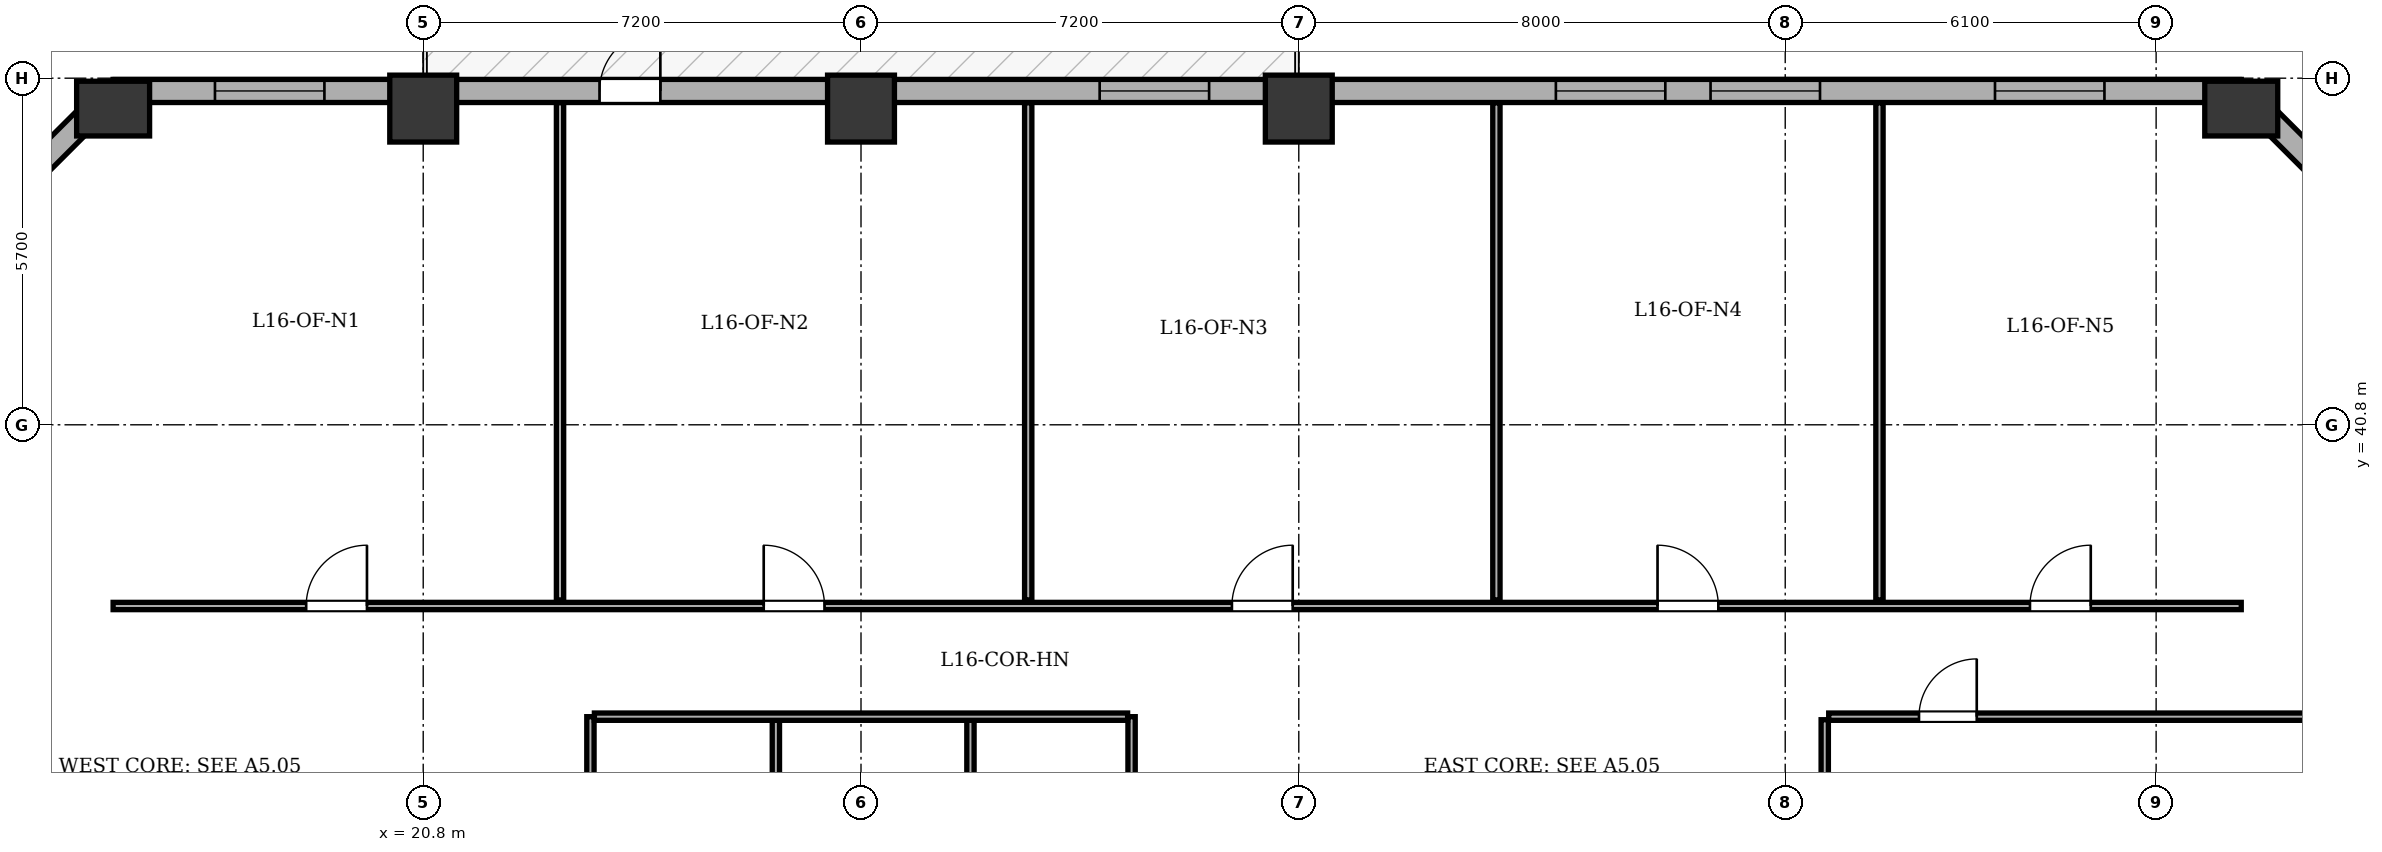
"""IFC4 building model, lengths in metres.
Left out: names, types, materials, properties, quantities, classifications, styles, units other than length and angle.
Written with IfcOpenShell. Run it as: python <this file> out.ifc"""

import sys

from ifc_helpers import new_model, si_unit, direction, frame, frame_2d, origin, origin_2d, place, context, subcontext, project, spatial, rectangle, extrude, element, fill, save


model = new_model("IFC4")
c1 = context("Model", 3, precision=1e-05, world=origin(), true_north=direction((0.0, 1.0)))
c2 = subcontext(c1, "Body", "Model", "MODEL_VIEW")
j1 = project(units=[si_unit("LENGTHUNIT", "METRE"), si_unit("PLANEANGLEUNIT", "RADIAN")], contexts=[c1])
p1 = place(None, origin())
s1 = spatial("IfcSite", under=j1, at=p1, CompositionType="ELEMENT")
p2 = place(p1, origin())
s2 = spatial("IfcBuilding", under=s1, at=p2, CompositionType="ELEMENT")
p3 = place(p2, frame((0.0, 0.0, 67.2)))
s3 = spatial("IfcBuildingStorey", under=s2, at=p3, CompositionType="ELEMENT", Elevation=67.2)
p4 = place(p3, frame((15.7, 46.0, 0.0), z_axis=(0.0, 0.0, 1.0), x_axis=(1.0, 0.0, 0.0)))
e1 = element("IfcColumn", 1, at=p4, inside=s3, PredefinedType="COLUMN", context=c2, shape_type="SweptSolid", body=[
    extrude(rectangle(XDim=0.9, YDim=1.2, at=origin_2d()), origin(), (0.0, 0.0, 1.0), 3.9),
])
for number, where, z_axis, x_axis in (
    (2, (20.8, 46.0, 0.0), (0.0, 0.0, 1.0), (1.0, 0.0, 0.0)),
    (3, (28.0, 46.0, 0.0), (0.0, 0.0, 1.0), (1.0, 0.0, 0.0)),
    (4, (35.2, 46.0, 0.0), (0.0, 0.0, 1.0), (1.0, 0.0, 0.0)),
):
    element("IfcColumn", number, at=place(p3, frame(where, z_axis=z_axis, x_axis=x_axis)), inside=s3, PredefinedType="COLUMN", context=c2, shape_type="SweptSolid", body=[
        extrude(rectangle(XDim=1.1, YDim=1.1, at=origin_2d()), origin(), (0.0, 0.0, 1.0), 3.9),
    ])
p5 = place(p3, frame((50.7, 46.0, 0.0), z_axis=(0.0, 0.0, 1.0), x_axis=(1.0, 0.0, 0.0)))
e5 = element("IfcColumn", 5, at=p5, inside=s3, PredefinedType="COLUMN", context=c2, shape_type="SweptSolid", body=[
    extrude(rectangle(XDim=0.9, YDim=1.2, at=origin_2d()), origin(), (0.0, 0.0, 1.0), 3.9),
])
p6 = place(p3, frame((10.91, 41.5, 0.0), z_axis=(0.0, 0.0, 1.0), x_axis=(0.707106781187, 0.707106781187, 0.0)))
e6 = element("IfcWall", 6, at=p6, inside=s3, PredefinedType="STANDARD", context=c2, shape_type="SweptSolid", body=[
    extrude(rectangle(XDim=6.774, YDim=0.38, at=frame_2d((3.387, 0.0))), origin(), (0.0, 0.0, 1.0), 2.835),
])
p7 = place(p6, frame((2.687, 0.0, 0.8)))
e7 = element("IfcOpeningElement", 7, at=p7, cuts=e6, PredefinedType="OPENING", context=c2, shape_type="SweptSolid", body=[
    extrude(rectangle(XDim=1.4, YDim=1.65, at=frame_2d((0.7, 0.825))), frame((0.0, 0.2, 0.0), z_axis=(0.0, -1.0, 0.0), x_axis=(1.0, 0.0, 0.0)), (0.0, 0.0, 1.0), 0.4),
])
p8 = place(p3, frame((15.7, 46.29, 0.0), z_axis=(0.0, 0.0, 1.0), x_axis=(1.0, 0.0, 0.0)))
e8 = element("IfcWall", 8, at=p8, inside=s3, PredefinedType="STANDARD", context=c2, shape_type="SweptSolid", body=[
    extrude(rectangle(XDim=35.0, YDim=0.38, at=frame_2d((17.5, 0.0))), origin(), (0.0, 0.0, 1.0), 2.835),
])
p9 = place(p8, frame((8.0, 0.0, 0.0)))
e9 = element("IfcOpeningElement", 9, at=p9, cuts=e8, PredefinedType="OPENING", context=c2, shape_type="SweptSolid", body=[
    extrude(rectangle(XDim=1.0, YDim=2.02, at=frame_2d((0.5, 1.01))), frame((0.0, 0.2, 0.0), z_axis=(0.0, -1.0, 0.0), x_axis=(1.0, 0.0, 0.0)), (0.0, 0.0, 1.0), 0.4),
])
p10 = place(p8, frame((1.675, 0.0, 0.8)))
e10 = element("IfcOpeningElement", 10, at=p10, cuts=e8, PredefinedType="OPENING", context=c2, shape_type="SweptSolid", body=[
    extrude(rectangle(XDim=1.8, YDim=1.9, at=frame_2d((0.9, 0.95))), frame((0.0, 0.2, 0.0), z_axis=(0.0, -1.0, 0.0), x_axis=(1.0, 0.0, 0.0)), (0.0, 0.0, 1.0), 0.4),
])
p11 = place(p8, frame((16.225, 0.0, 0.8)))
e11 = element("IfcOpeningElement", 11, at=p11, cuts=e8, PredefinedType="OPENING", context=c2, shape_type="SweptSolid", body=[
    extrude(rectangle(XDim=1.8, YDim=1.9, at=frame_2d((0.9, 0.95))), frame((0.0, 0.2, 0.0), z_axis=(0.0, -1.0, 0.0), x_axis=(1.0, 0.0, 0.0)), (0.0, 0.0, 1.0), 0.4),
])
p12 = place(p8, frame((23.728, 0.0, 0.8)))
e12 = element("IfcOpeningElement", 12, at=p12, cuts=e8, PredefinedType="OPENING", context=c2, shape_type="SweptSolid", body=[
    extrude(rectangle(XDim=1.8, YDim=1.9, at=frame_2d((0.9, 0.95))), frame((0.0, 0.2, 0.0), z_axis=(0.0, -1.0, 0.0), x_axis=(1.0, 0.0, 0.0)), (0.0, 0.0, 1.0), 0.4),
])
p13 = place(p8, frame((26.272, 0.0, 0.8)))
e13 = element("IfcOpeningElement", 13, at=p13, cuts=e8, PredefinedType="OPENING", context=c2, shape_type="SweptSolid", body=[
    extrude(rectangle(XDim=1.8, YDim=1.9, at=frame_2d((0.9, 0.95))), frame((0.0, 0.2, 0.0), z_axis=(0.0, -1.0, 0.0), x_axis=(1.0, 0.0, 0.0)), (0.0, 0.0, 1.0), 0.4),
])
p14 = place(p8, frame((30.95, 0.0, 0.8)))
e14 = element("IfcOpeningElement", 14, at=p14, cuts=e8, PredefinedType="OPENING", context=c2, shape_type="SweptSolid", body=[
    extrude(rectangle(XDim=1.8, YDim=1.9, at=frame_2d((0.9, 0.95))), frame((0.0, 0.2, 0.0), z_axis=(0.0, -1.0, 0.0), x_axis=(1.0, 0.0, 0.0)), (0.0, 0.0, 1.0), 0.4),
])
p15 = place(p3, frame((50.7, 46.29, 0.0), z_axis=(0.0, 0.0, 1.0), x_axis=(0.707106781187, -0.707106781187, 0.0)))
e15 = element("IfcWall", 15, at=p15, inside=s3, PredefinedType="STANDARD", context=c2, shape_type="SweptSolid", body=[
    extrude(rectangle(XDim=6.774, YDim=0.38, at=frame_2d((3.387, 0.0))), origin(), (0.0, 0.0, 1.0), 2.835),
])
p16 = place(p15, frame((2.687, 0.0, 0.8)))
e16 = element("IfcOpeningElement", 16, at=p16, cuts=e15, PredefinedType="OPENING", context=c2, shape_type="SweptSolid", body=[
    extrude(rectangle(XDim=1.4, YDim=1.65, at=frame_2d((0.7, 0.825))), frame((0.0, 0.2, 0.0), z_axis=(0.0, -1.0, 0.0), x_axis=(1.0, 0.0, 0.0)), (0.0, 0.0, 1.0), 0.4),
])
for number, where, z_axis, x_axis in (
    (17, (23.55, 24.715, 0.0), (0.0, 0.0, 1.0), (0.0, 1.0, 0.0)),
    (18, (32.45, 24.715, 0.0), (0.0, 0.0, 1.0), (0.0, 1.0, 0.0)),
    (19, (26.6, 24.715, 0.0), (0.0, 0.0, 1.0), (0.0, 1.0, 0.0)),
):
    element("IfcWall", number, at=place(p3, frame(where, z_axis=z_axis, x_axis=x_axis)), inside=s3, PredefinedType="PARTITIONING", context=c2, shape_type="SweptSolid", body=[
        extrude(rectangle(XDim=11.285, YDim=0.12, at=frame_2d((5.643, 0.0))), origin(), (0.0, 0.0, 1.0), 3.45),
    ])
p17 = place(p3, frame((29.8, 24.715, 0.0), z_axis=(0.0, 0.0, 1.0), x_axis=(0.0, 1.0, 0.0)))
e20 = element("IfcWall", 20, at=p17, inside=s3, PredefinedType="PARTITIONING", context=c2, shape_type="SweptSolid", body=[
    extrude(rectangle(XDim=11.285, YDim=0.12, at=frame_2d((5.643, 0.0))), origin(), (0.0, 0.0, 1.0), 2.885),
])
p18 = place(p3, frame((23.615, 36.0, 0.0), z_axis=(0.0, 0.0, 1.0), x_axis=(1.0, 0.0, 0.0)))
e21 = element("IfcWall", 21, at=p18, inside=s3, PredefinedType="PARTITIONING", context=c2, shape_type="SweptSolid", body=[
    extrude(rectangle(XDim=8.77, YDim=0.12, at=frame_2d((4.385, 0.0))), origin(), (0.0, 0.0, 1.0), 3.45),
])
p19 = place(p3, frame((15.7, 37.82, 0.0), z_axis=(0.0, 0.0, 1.0), x_axis=(1.0, 0.0, 0.0)))
e22 = element("IfcWall", 22, at=p19, inside=s3, PredefinedType="PARTITIONING", context=c2, shape_type="SweptSolid", body=[
    extrude(rectangle(XDim=35.0, YDim=0.12, at=frame_2d((17.5, 0.0))), origin(), (0.0, 0.0, 1.0), 3.45),
])
p20 = place(p19, frame((3.175, 0.0, 0.0)))
e23 = element("IfcOpeningElement", 23, at=p20, cuts=e22, PredefinedType="OPENING", context=c2, shape_type="SweptSolid", body=[
    extrude(rectangle(XDim=1.0, YDim=2.1, at=frame_2d((0.5, 1.05))), frame((0.0, 0.07, 0.0), z_axis=(0.0, -1.0, 0.0), x_axis=(1.0, 0.0, 0.0)), (0.0, 0.0, 1.0), 0.14),
])
p21 = place(p19, frame((10.7, 0.0, 0.0)))
e24 = element("IfcOpeningElement", 24, at=p21, cuts=e22, PredefinedType="OPENING", context=c2, shape_type="SweptSolid", body=[
    extrude(rectangle(XDim=1.0, YDim=2.1, at=frame_2d((0.5, 1.05))), frame((0.0, 0.07, 0.0), z_axis=(0.0, -1.0, 0.0), x_axis=(1.0, 0.0, 0.0)), (0.0, 0.0, 1.0), 0.14),
])
p22 = place(p19, frame((18.4, 0.0, 0.0)))
e25 = element("IfcOpeningElement", 25, at=p22, cuts=e22, PredefinedType="OPENING", context=c2, shape_type="SweptSolid", body=[
    extrude(rectangle(XDim=1.0, YDim=2.1, at=frame_2d((0.5, 1.05))), frame((0.0, 0.07, 0.0), z_axis=(0.0, -1.0, 0.0), x_axis=(1.0, 0.0, 0.0)), (0.0, 0.0, 1.0), 0.14),
])
p23 = place(p19, frame((25.4, 0.0, 0.0)))
e26 = element("IfcOpeningElement", 26, at=p23, cuts=e22, PredefinedType="OPENING", context=c2, shape_type="SweptSolid", body=[
    extrude(rectangle(XDim=1.0, YDim=2.1, at=frame_2d((0.5, 1.05))), frame((0.0, 0.07, 0.0), z_axis=(0.0, -1.0, 0.0), x_axis=(1.0, 0.0, 0.0)), (0.0, 0.0, 1.0), 0.14),
])
p24 = place(p19, frame((31.525, 0.0, 0.0)))
e27 = element("IfcOpeningElement", 27, at=p24, cuts=e22, PredefinedType="OPENING", context=c2, shape_type="SweptSolid", body=[
    extrude(rectangle(XDim=1.0, YDim=2.1, at=frame_2d((0.5, 1.05))), frame((0.0, 0.07, 0.0), z_axis=(0.0, -1.0, 0.0), x_axis=(1.0, 0.0, 0.0)), (0.0, 0.0, 1.0), 0.14),
])
for number, where, z_axis, x_axis in (
    (28, (23.05, 37.92, 0.0), (0.0, 0.0, 1.0), (0.0, 1.0, 0.0)),
    (29, (30.75, 37.92, 0.0), (0.0, 0.0, 1.0), (0.0, 1.0, 0.0)),
):
    element("IfcWall", number, at=place(p3, frame(where, z_axis=z_axis, x_axis=x_axis)), inside=s3, PredefinedType="PARTITIONING", context=c2, shape_type="SweptSolid", body=[
        extrude(rectangle(XDim=8.175, YDim=0.12, at=frame_2d((4.087, 0.0))), origin(), (0.0, 0.0, 1.0), 3.45),
    ])
p25 = place(p3, frame((38.45, 37.92, 0.0), z_axis=(0.0, 0.0, 1.0), x_axis=(0.0, 1.0, 0.0)))
e30 = element("IfcWall", 30, at=p25, inside=s3, PredefinedType="PARTITIONING", context=c2, shape_type="SweptSolid", body=[
    extrude(rectangle(XDim=8.175, YDim=0.12, at=frame_2d((4.087, 0.0))), origin(), (0.0, 0.0, 1.0), 2.885),
])
p26 = place(p3, frame((44.75, 37.92, 0.0), z_axis=(0.0, 0.0, 1.0), x_axis=(0.0, 1.0, 0.0)))
e31 = element("IfcWall", 31, at=p26, inside=s3, PredefinedType="PARTITIONING", context=c2, shape_type="SweptSolid", body=[
    extrude(rectangle(XDim=8.175, YDim=0.12, at=frame_2d((4.087, 0.0))), origin(), (0.0, 0.0, 1.0), 3.45),
])
p27 = place(p3, frame((43.85, 18.45, 0.0), z_axis=(0.0, 0.0, 1.0), x_axis=(0.0, 1.0, 0.0)))
e32 = element("IfcWall", 32, at=p27, inside=s3, PredefinedType="PARTITIONING", context=c2, shape_type="SweptSolid", body=[
    extrude(rectangle(XDim=17.5, YDim=0.12, at=frame_2d((8.75, 0.0))), origin(), (0.0, 0.0, 1.0), 3.45),
])
p28 = place(p3, frame((43.915, 36.0, 0.0), z_axis=(0.0, 0.0, 1.0), x_axis=(1.0, 0.0, 0.0)))
e33 = element("IfcWall", 33, at=p28, inside=s3, PredefinedType="PARTITIONING", context=c2, shape_type="SweptSolid", body=[
    extrude(rectangle(XDim=11.38, YDim=0.12, at=frame_2d((5.69, 0.0))), origin(), (0.0, 0.0, 1.0), 3.45),
])
p29 = place(p28, frame((1.485, 0.0, 0.0)))
e34 = element("IfcOpeningElement", 34, at=p29, cuts=e33, PredefinedType="OPENING", context=c2, shape_type="SweptSolid", body=[
    extrude(rectangle(XDim=0.95, YDim=2.1, at=frame_2d((0.475, 1.05))), frame((0.0, 0.07, 0.0), z_axis=(0.0, -1.0, 0.0), x_axis=(1.0, 0.0, 0.0)), (0.0, 0.0, 1.0), 0.14),
])
p30 = place(p9, origin())
e35 = element("IfcDoor", 35, at=p30, inside=s3, OperationType="SINGLE_SWING_RIGHT", PredefinedType="DOOR", context=c2, shape_type="SweptSolid", body=[
    extrude(rectangle(XDim=1.0, YDim=2.02, at=frame_2d((0.5, 1.01))), frame((0.0, 0.025, 0.0), z_axis=(0.0, -1.0, 0.0), x_axis=(1.0, 0.0, 0.0)), (0.0, 0.0, 1.0), 0.05),
])
fill(e9, e35)
p31 = place(p10, origin())
e36 = element("IfcWindow", 36, at=p31, inside=s3, PartitioningType="SINGLE_PANEL", PredefinedType="WINDOW", context=c2, shape_type="SweptSolid", body=[
    extrude(rectangle(XDim=1.8, YDim=1.9, at=frame_2d((0.9, 0.95))), frame((0.0, -0.01, 0.0), z_axis=(0.0, -1.0, 0.0), x_axis=(1.0, 0.0, 0.0)), (0.0, 0.0, 1.0), 0.06),
])
fill(e10, e36)
p32 = place(p11, origin())
e37 = element("IfcWindow", 37, at=p32, inside=s3, PartitioningType="SINGLE_PANEL", PredefinedType="WINDOW", context=c2, shape_type="SweptSolid", body=[
    extrude(rectangle(XDim=1.8, YDim=1.9, at=frame_2d((0.9, 0.95))), frame((0.0, -0.01, 0.0), z_axis=(0.0, -1.0, 0.0), x_axis=(1.0, 0.0, 0.0)), (0.0, 0.0, 1.0), 0.06),
])
fill(e11, e37)
p33 = place(p12, origin())
e38 = element("IfcWindow", 38, at=p33, inside=s3, PartitioningType="SINGLE_PANEL", PredefinedType="WINDOW", context=c2, shape_type="SweptSolid", body=[
    extrude(rectangle(XDim=1.8, YDim=1.9, at=frame_2d((0.9, 0.95))), frame((0.0, -0.01, 0.0), z_axis=(0.0, -1.0, 0.0), x_axis=(1.0, 0.0, 0.0)), (0.0, 0.0, 1.0), 0.06),
])
fill(e12, e38)
p34 = place(p13, origin())
e39 = element("IfcWindow", 39, at=p34, inside=s3, PartitioningType="SINGLE_PANEL", PredefinedType="WINDOW", context=c2, shape_type="SweptSolid", body=[
    extrude(rectangle(XDim=1.8, YDim=1.9, at=frame_2d((0.9, 0.95))), frame((0.0, -0.01, 0.0), z_axis=(0.0, -1.0, 0.0), x_axis=(1.0, 0.0, 0.0)), (0.0, 0.0, 1.0), 0.06),
])
fill(e13, e39)
p35 = place(p14, origin())
e40 = element("IfcWindow", 40, at=p35, inside=s3, PartitioningType="SINGLE_PANEL", PredefinedType="WINDOW", context=c2, shape_type="SweptSolid", body=[
    extrude(rectangle(XDim=1.8, YDim=1.9, at=frame_2d((0.9, 0.95))), frame((0.0, -0.01, 0.0), z_axis=(0.0, -1.0, 0.0), x_axis=(1.0, 0.0, 0.0)), (0.0, 0.0, 1.0), 0.06),
])
fill(e14, e40)
p36 = place(p20, origin())
e41 = element("IfcDoor", 41, at=p36, inside=s3, OperationType="SINGLE_SWING_RIGHT", PredefinedType="DOOR", context=c2, shape_type="SweptSolid", body=[
    extrude(rectangle(XDim=1.0, YDim=2.1, at=frame_2d((0.5, 1.05))), frame((0.0, 0.025, 0.0), z_axis=(0.0, -1.0, 0.0), x_axis=(1.0, 0.0, 0.0)), (0.0, 0.0, 1.0), 0.05),
])
fill(e23, e41)
p37 = place(p21, origin())
e42 = element("IfcDoor", 42, at=p37, inside=s3, OperationType="SINGLE_SWING_LEFT", PredefinedType="DOOR", context=c2, shape_type="SweptSolid", body=[
    extrude(rectangle(XDim=1.0, YDim=2.1, at=frame_2d((0.5, 1.05))), frame((0.0, 0.025, 0.0), z_axis=(0.0, -1.0, 0.0), x_axis=(1.0, 0.0, 0.0)), (0.0, 0.0, 1.0), 0.05),
])
fill(e24, e42)
p38 = place(p22, origin())
e43 = element("IfcDoor", 43, at=p38, inside=s3, OperationType="SINGLE_SWING_RIGHT", PredefinedType="DOOR", context=c2, shape_type="SweptSolid", body=[
    extrude(rectangle(XDim=1.0, YDim=2.1, at=frame_2d((0.5, 1.05))), frame((0.0, 0.025, 0.0), z_axis=(0.0, -1.0, 0.0), x_axis=(1.0, 0.0, 0.0)), (0.0, 0.0, 1.0), 0.05),
])
fill(e25, e43)
p39 = place(p23, origin())
e44 = element("IfcDoor", 44, at=p39, inside=s3, OperationType="SINGLE_SWING_LEFT", PredefinedType="DOOR", context=c2, shape_type="SweptSolid", body=[
    extrude(rectangle(XDim=1.0, YDim=2.1, at=frame_2d((0.5, 1.05))), frame((0.0, 0.025, 0.0), z_axis=(0.0, -1.0, 0.0), x_axis=(1.0, 0.0, 0.0)), (0.0, 0.0, 1.0), 0.05),
])
fill(e26, e44)
p40 = place(p24, origin())
e45 = element("IfcDoor", 45, at=p40, inside=s3, OperationType="SINGLE_SWING_RIGHT", PredefinedType="DOOR", context=c2, shape_type="SweptSolid", body=[
    extrude(rectangle(XDim=1.0, YDim=2.1, at=frame_2d((0.5, 1.05))), frame((0.0, 0.025, 0.0), z_axis=(0.0, -1.0, 0.0), x_axis=(1.0, 0.0, 0.0)), (0.0, 0.0, 1.0), 0.05),
])
fill(e27, e45)
p41 = place(p29, origin())
e46 = element("IfcDoor", 46, at=p41, inside=s3, OperationType="SINGLE_SWING_RIGHT", PredefinedType="DOOR", context=c2, shape_type="SweptSolid", body=[
    extrude(rectangle(XDim=0.95, YDim=2.1, at=frame_2d((0.475, 1.05))), frame((0.0, 0.025, 0.0), z_axis=(0.0, -1.0, 0.0), x_axis=(1.0, 0.0, 0.0)), (0.0, 0.0, 1.0), 0.05),
])
fill(e34, e46)
save(model, sys.argv[1])
